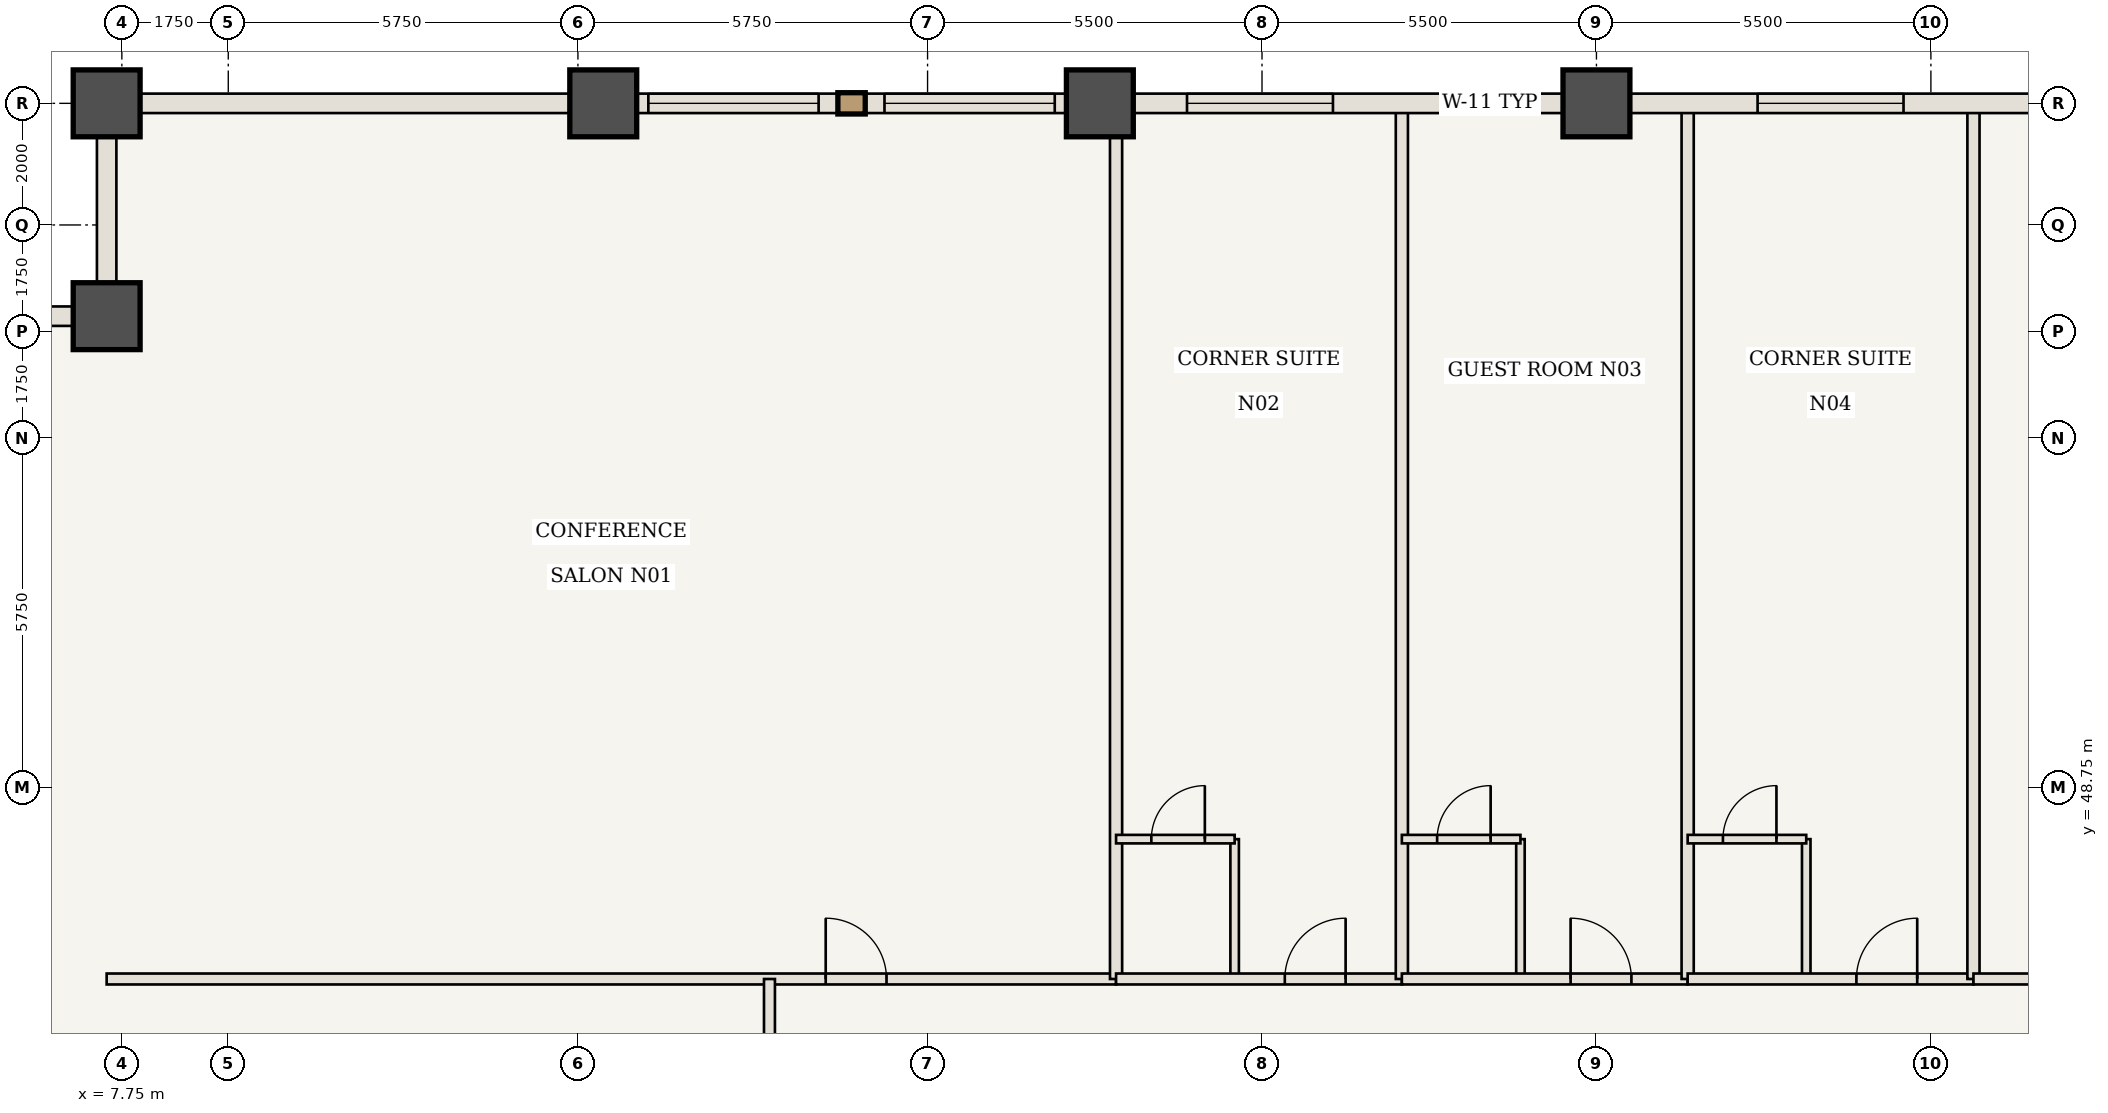
"""IFC4 building model, lengths in metres.
Left out: names, types, materials, properties, quantities, classifications, styles, units other than length and angle.
Written with IfcOpenShell. Run it as: python <this file> out.ifc"""

import sys

from ifc_helpers import new_model, si_unit, direction, frame, frame_2d, origin, origin_2d, place, context, subcontext, project, spatial, rectangle, extrude, element, fill, save


model = new_model("IFC4")
c1 = context("Model", 3, precision=1e-05, world=origin(), true_north=direction((0.0, 1.0)))
c2 = subcontext(c1, "Body", "Model", "MODEL_VIEW")
j1 = project(units=[si_unit("LENGTHUNIT", "METRE"), si_unit("PLANEANGLEUNIT", "RADIAN")], contexts=[c1])
p1 = place(None, origin())
s1 = spatial("IfcSite", under=j1, at=p1, CompositionType="ELEMENT")
p2 = place(p1, origin())
s2 = spatial("IfcBuilding", under=s1, at=p2, CompositionType="ELEMENT")
p3 = place(p2, frame((0.0, 0.0, 42.35)))
s3 = spatial("IfcBuildingStorey", under=s2, at=p3, CompositionType="ELEMENT", Elevation=42.35)
for number, where, z_axis, x_axis in (
    (1, (7.5, 60.0, 0.0), (0.0, 0.0, 1.0), (1.0, 0.0, 0.0)),
    (2, (7.5, 56.5, 0.0), (0.0, 0.0, 1.0), (1.0, 0.0, 0.0)),
    (3, (15.667, 60.0, 0.0), (0.0, 0.0, 1.0), (1.0, 0.0, 0.0)),
    (4, (23.833, 60.0, 0.0), (0.0, 0.0, 1.0), (1.0, 0.0, 0.0)),
    (5, (32.0, 60.0, 0.0), (0.0, 0.0, 1.0), (1.0, 0.0, 0.0)),
):
    element("IfcColumn", number, at=place(p3, frame(where, z_axis=z_axis, x_axis=x_axis)), inside=s3, PredefinedType="COLUMN", context=c2, shape_type="SweptSolid", body=[
        extrude(rectangle(XDim=1.1, YDim=1.1, at=origin_2d()), origin(), (0.0, 0.0, 1.0), 3.5),
    ])
p4 = place(p3, frame((7.5, 45.6, 0.0), z_axis=(0.0, 0.0, 1.0), x_axis=(1.0, 0.0, 0.0)))
e6 = element("IfcWall", 6, at=p4, inside=s3, PredefinedType="STANDARD", context=c2, shape_type="SweptSolid", body=[
    extrude(rectangle(XDim=16.6, YDim=0.18, at=frame_2d((8.3, 0.0))), origin(), (0.0, 0.0, 1.0), 3.32),
])
p5 = place(p4, frame((11.825, 0.0, 0.0)))
e7 = element("IfcOpeningElement", 7, at=p5, cuts=e6, PredefinedType="OPENING", context=c2, shape_type="SweptSolid", body=[
    extrude(rectangle(XDim=1.0, YDim=2.15, at=frame_2d((0.5, 1.075))), frame((0.0, 0.1, 0.0), z_axis=(0.0, -1.0, 0.0), x_axis=(1.0, 0.0, 0.0)), (0.0, 0.0, 1.0), 0.2),
])
p6 = place(p3, frame((24.1, 45.6, 0.0), z_axis=(0.0, 0.0, 1.0), x_axis=(0.0, 1.0, 0.0)))
e8 = element("IfcWall", 8, at=p6, inside=s3, PredefinedType="STANDARD", context=c2, shape_type="SweptSolid", body=[
    extrude(rectangle(XDim=14.34, YDim=0.2, at=frame_2d((7.17, 0.0))), origin(), (0.0, 0.0, 1.0), 3.32),
])
p7 = place(p3, frame((26.05, 45.6, 0.0), z_axis=(0.0, 0.0, 1.0), x_axis=(0.0, 1.0, 0.0)))
e9 = element("IfcWall", 9, at=p7, inside=s3, PredefinedType="STANDARD", context=c2, shape_type="SweptSolid", body=[
    extrude(rectangle(XDim=2.3, YDim=0.14, at=frame_2d((1.15, 0.0))), origin(), (0.0, 0.0, 1.0), 3.32),
])
p8 = place(p3, frame((24.1, 47.9, 0.0), z_axis=(0.0, 0.0, 1.0), x_axis=(1.0, 0.0, 0.0)))
e10 = element("IfcWall", 10, at=p8, inside=s3, PredefinedType="STANDARD", context=c2, shape_type="SweptSolid", body=[
    extrude(rectangle(XDim=1.95, YDim=0.14, at=frame_2d((0.975, 0.0))), origin(), (0.0, 0.0, 1.0), 3.32),
])
p9 = place(p8, frame((0.58, 0.0, 0.0)))
e11 = element("IfcOpeningElement", 11, at=p9, cuts=e10, PredefinedType="OPENING", context=c2, shape_type="SweptSolid", body=[
    extrude(rectangle(XDim=0.88, YDim=2.1, at=frame_2d((0.44, 1.05))), frame((0.0, 0.08, 0.0), z_axis=(0.0, -1.0, 0.0), x_axis=(1.0, 0.0, 0.0)), (0.0, 0.0, 1.0), 0.16),
])
p10 = place(p3, frame((24.1, 45.6, 0.0), z_axis=(0.0, 0.0, 1.0), x_axis=(1.0, 0.0, 0.0)))
e12 = element("IfcWall", 12, at=p10, inside=s3, PredefinedType="STANDARD", context=c2, shape_type="SweptSolid", body=[
    extrude(rectangle(XDim=4.7, YDim=0.18, at=frame_2d((2.35, 0.0))), origin(), (0.0, 0.0, 1.0), 3.32),
])
p11 = place(p10, frame((2.775, 0.0, 0.0)))
e13 = element("IfcOpeningElement", 13, at=p11, cuts=e12, PredefinedType="OPENING", context=c2, shape_type="SweptSolid", body=[
    extrude(rectangle(XDim=1.0, YDim=2.15, at=frame_2d((0.5, 1.075))), frame((0.0, 0.1, 0.0), z_axis=(0.0, -1.0, 0.0), x_axis=(1.0, 0.0, 0.0)), (0.0, 0.0, 1.0), 0.2),
])
p12 = place(p3, frame((28.8, 45.6, 0.0), z_axis=(0.0, 0.0, 1.0), x_axis=(0.0, 1.0, 0.0)))
e14 = element("IfcWall", 14, at=p12, inside=s3, PredefinedType="STANDARD", context=c2, shape_type="SweptSolid", body=[
    extrude(rectangle(XDim=14.34, YDim=0.2, at=frame_2d((7.17, 0.0))), origin(), (0.0, 0.0, 1.0), 3.32),
])
p13 = place(p3, frame((30.75, 45.6, 0.0), z_axis=(0.0, 0.0, 1.0), x_axis=(0.0, 1.0, 0.0)))
e15 = element("IfcWall", 15, at=p13, inside=s3, PredefinedType="STANDARD", context=c2, shape_type="SweptSolid", body=[
    extrude(rectangle(XDim=2.3, YDim=0.14, at=frame_2d((1.15, 0.0))), origin(), (0.0, 0.0, 1.0), 3.32),
])
p14 = place(p3, frame((28.8, 47.9, 0.0), z_axis=(0.0, 0.0, 1.0), x_axis=(1.0, 0.0, 0.0)))
e16 = element("IfcWall", 16, at=p14, inside=s3, PredefinedType="STANDARD", context=c2, shape_type="SweptSolid", body=[
    extrude(rectangle(XDim=1.95, YDim=0.14, at=frame_2d((0.975, 0.0))), origin(), (0.0, 0.0, 1.0), 3.32),
])
p15 = place(p14, frame((0.58, 0.0, 0.0)))
e17 = element("IfcOpeningElement", 17, at=p15, cuts=e16, PredefinedType="OPENING", context=c2, shape_type="SweptSolid", body=[
    extrude(rectangle(XDim=0.88, YDim=2.1, at=frame_2d((0.44, 1.05))), frame((0.0, 0.08, 0.0), z_axis=(0.0, -1.0, 0.0), x_axis=(1.0, 0.0, 0.0)), (0.0, 0.0, 1.0), 0.16),
])
p16 = place(p3, frame((28.8, 45.6, 0.0), z_axis=(0.0, 0.0, 1.0), x_axis=(1.0, 0.0, 0.0)))
e18 = element("IfcWall", 18, at=p16, inside=s3, PredefinedType="STANDARD", context=c2, shape_type="SweptSolid", body=[
    extrude(rectangle(XDim=4.7, YDim=0.18, at=frame_2d((2.35, 0.0))), origin(), (0.0, 0.0, 1.0), 3.32),
])
p17 = place(p16, frame((2.775, 0.0, 0.0)))
e19 = element("IfcOpeningElement", 19, at=p17, cuts=e18, PredefinedType="OPENING", context=c2, shape_type="SweptSolid", body=[
    extrude(rectangle(XDim=1.0, YDim=2.15, at=frame_2d((0.5, 1.075))), frame((0.0, 0.1, 0.0), z_axis=(0.0, -1.0, 0.0), x_axis=(1.0, 0.0, 0.0)), (0.0, 0.0, 1.0), 0.2),
])
p18 = place(p3, frame((33.5, 45.6, 0.0), z_axis=(0.0, 0.0, 1.0), x_axis=(0.0, 1.0, 0.0)))
e20 = element("IfcWall", 20, at=p18, inside=s3, PredefinedType="STANDARD", context=c2, shape_type="SweptSolid", body=[
    extrude(rectangle(XDim=14.34, YDim=0.2, at=frame_2d((7.17, 0.0))), origin(), (0.0, 0.0, 1.0), 3.32),
])
p19 = place(p3, frame((35.45, 45.6, 0.0), z_axis=(0.0, 0.0, 1.0), x_axis=(0.0, 1.0, 0.0)))
e21 = element("IfcWall", 21, at=p19, inside=s3, PredefinedType="STANDARD", context=c2, shape_type="SweptSolid", body=[
    extrude(rectangle(XDim=2.3, YDim=0.14, at=frame_2d((1.15, 0.0))), origin(), (0.0, 0.0, 1.0), 3.32),
])
p20 = place(p3, frame((33.5, 47.9, 0.0), z_axis=(0.0, 0.0, 1.0), x_axis=(1.0, 0.0, 0.0)))
e22 = element("IfcWall", 22, at=p20, inside=s3, PredefinedType="STANDARD", context=c2, shape_type="SweptSolid", body=[
    extrude(rectangle(XDim=1.95, YDim=0.14, at=frame_2d((0.975, 0.0))), origin(), (0.0, 0.0, 1.0), 3.32),
])
p21 = place(p20, frame((0.58, 0.0, 0.0)))
e23 = element("IfcOpeningElement", 23, at=p21, cuts=e22, PredefinedType="OPENING", context=c2, shape_type="SweptSolid", body=[
    extrude(rectangle(XDim=0.88, YDim=2.1, at=frame_2d((0.44, 1.05))), frame((0.0, 0.08, 0.0), z_axis=(0.0, -1.0, 0.0), x_axis=(1.0, 0.0, 0.0)), (0.0, 0.0, 1.0), 0.16),
])
p22 = place(p3, frame((33.5, 45.6, 0.0), z_axis=(0.0, 0.0, 1.0), x_axis=(1.0, 0.0, 0.0)))
e24 = element("IfcWall", 24, at=p22, inside=s3, PredefinedType="STANDARD", context=c2, shape_type="SweptSolid", body=[
    extrude(rectangle(XDim=4.7, YDim=0.18, at=frame_2d((2.35, 0.0))), origin(), (0.0, 0.0, 1.0), 3.32),
])
p23 = place(p22, frame((2.775, 0.0, 0.0)))
e25 = element("IfcOpeningElement", 25, at=p23, cuts=e24, PredefinedType="OPENING", context=c2, shape_type="SweptSolid", body=[
    extrude(rectangle(XDim=1.0, YDim=2.15, at=frame_2d((0.5, 1.075))), frame((0.0, 0.1, 0.0), z_axis=(0.0, -1.0, 0.0), x_axis=(1.0, 0.0, 0.0)), (0.0, 0.0, 1.0), 0.2),
])
p24 = place(p3, frame((38.2, 45.6, 0.0), z_axis=(0.0, 0.0, 1.0), x_axis=(0.0, 1.0, 0.0)))
e26 = element("IfcWall", 26, at=p24, inside=s3, PredefinedType="STANDARD", context=c2, shape_type="SweptSolid", body=[
    extrude(rectangle(XDim=14.34, YDim=0.2, at=frame_2d((7.17, 0.0))), origin(), (0.0, 0.0, 1.0), 3.32),
])
p25 = place(p3, frame((38.2, 45.6, 0.0), z_axis=(0.0, 0.0, 1.0), x_axis=(1.0, 0.0, 0.0)))
e27 = element("IfcWall", 27, at=p25, inside=s3, PredefinedType="STANDARD", context=c2, shape_type="SweptSolid", body=[
    extrude(rectangle(XDim=18.3, YDim=0.18, at=frame_2d((9.15, 0.0))), origin(), (0.0, 0.0, 1.0), 3.32),
])
p26 = place(p25, frame((4.625, 0.0, 0.0)))
e28 = element("IfcOpeningElement", 28, at=p26, cuts=e27, PredefinedType="OPENING", context=c2, shape_type="SweptSolid", body=[
    extrude(rectangle(XDim=1.0, YDim=2.15, at=frame_2d((0.5, 1.075))), frame((0.0, 0.1, 0.0), z_axis=(0.0, -1.0, 0.0), x_axis=(1.0, 0.0, 0.0)), (0.0, 0.0, 1.0), 0.2),
])
p27 = place(p3, frame((18.4, 41.9, 0.0), z_axis=(0.0, 0.0, 1.0), x_axis=(0.0, 1.0, 0.0)))
e29 = element("IfcWall", 29, at=p27, inside=s3, PredefinedType="STANDARD", context=c2, shape_type="SweptSolid", body=[
    extrude(rectangle(XDim=3.7, YDim=0.18, at=frame_2d((1.85, 0.0))), origin(), (0.0, 0.0, 1.0), 3.32),
])
p28 = place(p27, frame((1.35, 0.0, 0.0)))
e30 = element("IfcOpeningElement", 30, at=p28, cuts=e29, PredefinedType="OPENING", context=c2, shape_type="SweptSolid", body=[
    extrude(rectangle(XDim=1.0, YDim=2.15, at=frame_2d((0.5, 1.075))), frame((0.0, 0.1, 0.0), z_axis=(0.0, -1.0, 0.0), x_axis=(1.0, 0.0, 0.0)), (0.0, 0.0, 1.0), 0.2),
])
p29 = place(p3, frame((7.5, 60.0, 0.0), z_axis=(0.0, 0.0, 1.0), x_axis=(1.0, 0.0, 0.0)))
e31 = element("IfcWall", 31, at=p29, inside=s3, PredefinedType="USERDEFINED", context=c2, shape_type="SweptSolid", body=[
    extrude(rectangle(XDim=8.167, YDim=0.32, at=frame_2d((4.083, 0.0))), origin(), (0.0, 0.0, 1.0), 2.52),
])
p30 = place(p3, frame((15.667, 60.0, 0.0), z_axis=(0.0, 0.0, 1.0), x_axis=(1.0, 0.0, 0.0)))
e32 = element("IfcWall", 32, at=p30, inside=s3, PredefinedType="USERDEFINED", context=c2, shape_type="SweptSolid", body=[
    extrude(rectangle(XDim=8.167, YDim=0.32, at=frame_2d((4.083, 0.0))), origin(), (0.0, 0.0, 1.0), 2.52),
])
p31 = place(p30, frame((0.742, 0.0, 0.85)))
e33 = element("IfcOpeningElement", 33, at=p31, cuts=e32, PredefinedType="OPENING", context=c2, shape_type="SweptSolid", body=[
    extrude(rectangle(XDim=2.8, YDim=1.47, at=frame_2d((1.4, 0.735))), frame((0.0, 0.17, 0.0), z_axis=(0.0, -1.0, 0.0), x_axis=(1.0, 0.0, 0.0)), (0.0, 0.0, 1.0), 0.34),
])
p32 = place(p30, frame((4.625, 0.0, 0.85)))
e34 = element("IfcOpeningElement", 34, at=p32, cuts=e32, PredefinedType="OPENING", context=c2, shape_type="SweptSolid", body=[
    extrude(rectangle(XDim=2.8, YDim=1.47, at=frame_2d((1.4, 0.735))), frame((0.0, 0.17, 0.0), z_axis=(0.0, -1.0, 0.0), x_axis=(1.0, 0.0, 0.0)), (0.0, 0.0, 1.0), 0.34),
])
p33 = place(p3, frame((23.833, 60.0, 0.0), z_axis=(0.0, 0.0, 1.0), x_axis=(1.0, 0.0, 0.0)))
e35 = element("IfcWall", 35, at=p33, inside=s3, PredefinedType="USERDEFINED", context=c2, shape_type="SweptSolid", body=[
    extrude(rectangle(XDim=8.167, YDim=0.32, at=frame_2d((4.083, 0.0))), origin(), (0.0, 0.0, 1.0), 2.52),
])
p34 = place(p33, frame((1.433, 0.0, 0.85)))
e36 = element("IfcOpeningElement", 36, at=p34, cuts=e35, PredefinedType="OPENING", context=c2, shape_type="SweptSolid", body=[
    extrude(rectangle(XDim=2.4, YDim=1.47, at=frame_2d((1.2, 0.735))), frame((0.0, 0.17, 0.0), z_axis=(0.0, -1.0, 0.0), x_axis=(1.0, 0.0, 0.0)), (0.0, 0.0, 1.0), 0.34),
])
p35 = place(p33, frame((5.617, 0.0, 0.85)))
e37 = element("IfcOpeningElement", 37, at=p35, cuts=e35, PredefinedType="OPENING", context=c2, shape_type="SweptSolid", body=[
    extrude(rectangle(XDim=1.6, YDim=1.47, at=frame_2d((0.8, 0.735))), frame((0.0, 0.17, 0.0), z_axis=(0.0, -1.0, 0.0), x_axis=(1.0, 0.0, 0.0)), (0.0, 0.0, 1.0), 0.34),
])
p36 = place(p3, frame((32.0, 60.0, 0.0), z_axis=(0.0, 0.0, 1.0), x_axis=(1.0, 0.0, 0.0)))
e38 = element("IfcWall", 38, at=p36, inside=s3, PredefinedType="USERDEFINED", context=c2, shape_type="SweptSolid", body=[
    extrude(rectangle(XDim=8.167, YDim=0.32, at=frame_2d((4.083, 0.0))), origin(), (0.0, 0.0, 1.0), 2.52),
])
p37 = place(p36, frame((2.65, 0.0, 0.85)))
e39 = element("IfcOpeningElement", 39, at=p37, cuts=e38, PredefinedType="OPENING", context=c2, shape_type="SweptSolid", body=[
    extrude(rectangle(XDim=2.4, YDim=1.47, at=frame_2d((1.2, 0.735))), frame((0.0, 0.17, 0.0), z_axis=(0.0, -1.0, 0.0), x_axis=(1.0, 0.0, 0.0)), (0.0, 0.0, 1.0), 0.34),
])
for number, where, z_axis, x_axis in (
    (40, (7.5, 56.5, 0.0), (0.0, 0.0, 1.0), (0.0, 1.0, 0.0)),
    (41, (4.0, 56.5, 0.0), (0.0, 0.0, 1.0), (1.0, 0.0, 0.0)),
):
    element("IfcWall", number, at=place(p3, frame(where, z_axis=z_axis, x_axis=x_axis)), inside=s3, PredefinedType="USERDEFINED", context=c2, shape_type="SweptSolid", body=[
        extrude(rectangle(XDim=3.5, YDim=0.32, at=frame_2d((1.75, 0.0))), origin(), (0.0, 0.0, 1.0), 2.52),
    ])
p38 = place(p5, origin())
e42 = element("IfcDoor", 42, at=p38, inside=s3, OperationType="SINGLE_SWING_LEFT", PredefinedType="DOOR", context=c2, shape_type="SweptSolid", body=[
    extrude(rectangle(XDim=1.0, YDim=2.15, at=frame_2d((0.5, 1.075))), frame((0.0, 0.025, 0.0), z_axis=(0.0, -1.0, 0.0), x_axis=(1.0, 0.0, 0.0)), (0.0, 0.0, 1.0), 0.05),
])
fill(e7, e42)
p39 = place(p9, origin())
e43 = element("IfcDoor", 43, at=p39, inside=s3, OperationType="SINGLE_SWING_RIGHT", PredefinedType="DOOR", context=c2, shape_type="SweptSolid", body=[
    extrude(rectangle(XDim=0.88, YDim=2.1, at=frame_2d((0.44, 1.05))), frame((0.0, 0.025, 0.0), z_axis=(0.0, -1.0, 0.0), x_axis=(1.0, 0.0, 0.0)), (0.0, 0.0, 1.0), 0.05),
])
fill(e11, e43)
p40 = place(p11, origin())
e44 = element("IfcDoor", 44, at=p40, inside=s3, OperationType="SINGLE_SWING_RIGHT", PredefinedType="DOOR", context=c2, shape_type="SweptSolid", body=[
    extrude(rectangle(XDim=1.0, YDim=2.15, at=frame_2d((0.5, 1.075))), frame((0.0, 0.025, 0.0), z_axis=(0.0, -1.0, 0.0), x_axis=(1.0, 0.0, 0.0)), (0.0, 0.0, 1.0), 0.05),
])
fill(e13, e44)
p41 = place(p15, origin())
e45 = element("IfcDoor", 45, at=p41, inside=s3, OperationType="SINGLE_SWING_RIGHT", PredefinedType="DOOR", context=c2, shape_type="SweptSolid", body=[
    extrude(rectangle(XDim=0.88, YDim=2.1, at=frame_2d((0.44, 1.05))), frame((0.0, 0.025, 0.0), z_axis=(0.0, -1.0, 0.0), x_axis=(1.0, 0.0, 0.0)), (0.0, 0.0, 1.0), 0.05),
])
fill(e17, e45)
p42 = place(p17, origin())
e46 = element("IfcDoor", 46, at=p42, inside=s3, OperationType="SINGLE_SWING_LEFT", PredefinedType="DOOR", context=c2, shape_type="SweptSolid", body=[
    extrude(rectangle(XDim=1.0, YDim=2.15, at=frame_2d((0.5, 1.075))), frame((0.0, 0.025, 0.0), z_axis=(0.0, -1.0, 0.0), x_axis=(1.0, 0.0, 0.0)), (0.0, 0.0, 1.0), 0.05),
])
fill(e19, e46)
p43 = place(p21, origin())
e47 = element("IfcDoor", 47, at=p43, inside=s3, OperationType="SINGLE_SWING_RIGHT", PredefinedType="DOOR", context=c2, shape_type="SweptSolid", body=[
    extrude(rectangle(XDim=0.88, YDim=2.1, at=frame_2d((0.44, 1.05))), frame((0.0, 0.025, 0.0), z_axis=(0.0, -1.0, 0.0), x_axis=(1.0, 0.0, 0.0)), (0.0, 0.0, 1.0), 0.05),
])
fill(e23, e47)
p44 = place(p23, origin())
e48 = element("IfcDoor", 48, at=p44, inside=s3, OperationType="SINGLE_SWING_RIGHT", PredefinedType="DOOR", context=c2, shape_type="SweptSolid", body=[
    extrude(rectangle(XDim=1.0, YDim=2.15, at=frame_2d((0.5, 1.075))), frame((0.0, 0.025, 0.0), z_axis=(0.0, -1.0, 0.0), x_axis=(1.0, 0.0, 0.0)), (0.0, 0.0, 1.0), 0.05),
])
fill(e25, e48)
p45 = place(p31, origin())
e49 = element("IfcWindow", 49, at=p45, inside=s3, PartitioningType="SINGLE_PANEL", PredefinedType="WINDOW", context=c2, shape_type="SweptSolid", body=[
    extrude(rectangle(XDim=2.8, YDim=1.47, at=frame_2d((1.4, 0.735))), frame((0.0, 0.03, 0.0), z_axis=(0.0, -1.0, 0.0), x_axis=(1.0, 0.0, 0.0)), (0.0, 0.0, 1.0), 0.06),
])
fill(e33, e49)
p46 = place(p32, origin())
e50 = element("IfcWindow", 50, at=p46, inside=s3, PartitioningType="SINGLE_PANEL", PredefinedType="WINDOW", context=c2, shape_type="SweptSolid", body=[
    extrude(rectangle(XDim=2.8, YDim=1.47, at=frame_2d((1.4, 0.735))), frame((0.0, 0.03, 0.0), z_axis=(0.0, -1.0, 0.0), x_axis=(1.0, 0.0, 0.0)), (0.0, 0.0, 1.0), 0.06),
])
fill(e34, e50)
p47 = place(p34, origin())
e51 = element("IfcWindow", 51, at=p47, inside=s3, PartitioningType="SINGLE_PANEL", PredefinedType="WINDOW", context=c2, shape_type="SweptSolid", body=[
    extrude(rectangle(XDim=2.4, YDim=1.47, at=frame_2d((1.2, 0.735))), frame((0.0, 0.03, 0.0), z_axis=(0.0, -1.0, 0.0), x_axis=(1.0, 0.0, 0.0)), (0.0, 0.0, 1.0), 0.06),
])
fill(e36, e51)
p48 = place(p35, origin())
e52 = element("IfcWindow", 52, at=p48, inside=s3, PartitioningType="SINGLE_PANEL", PredefinedType="WINDOW", context=c2, shape_type="SweptSolid", body=[
    extrude(rectangle(XDim=1.6, YDim=1.47, at=frame_2d((0.8, 0.735))), frame((0.0, 0.03, 0.0), z_axis=(0.0, -1.0, 0.0), x_axis=(1.0, 0.0, 0.0)), (0.0, 0.0, 1.0), 0.06),
])
fill(e37, e52)
p49 = place(p37, origin())
e53 = element("IfcWindow", 53, at=p49, inside=s3, PartitioningType="SINGLE_PANEL", PredefinedType="WINDOW", context=c2, shape_type="SweptSolid", body=[
    extrude(rectangle(XDim=2.4, YDim=1.47, at=frame_2d((1.2, 0.735))), frame((0.0, 0.03, 0.0), z_axis=(0.0, -1.0, 0.0), x_axis=(1.0, 0.0, 0.0)), (0.0, 0.0, 1.0), 0.06),
])
fill(e39, e53)
save(model, sys.argv[1])
